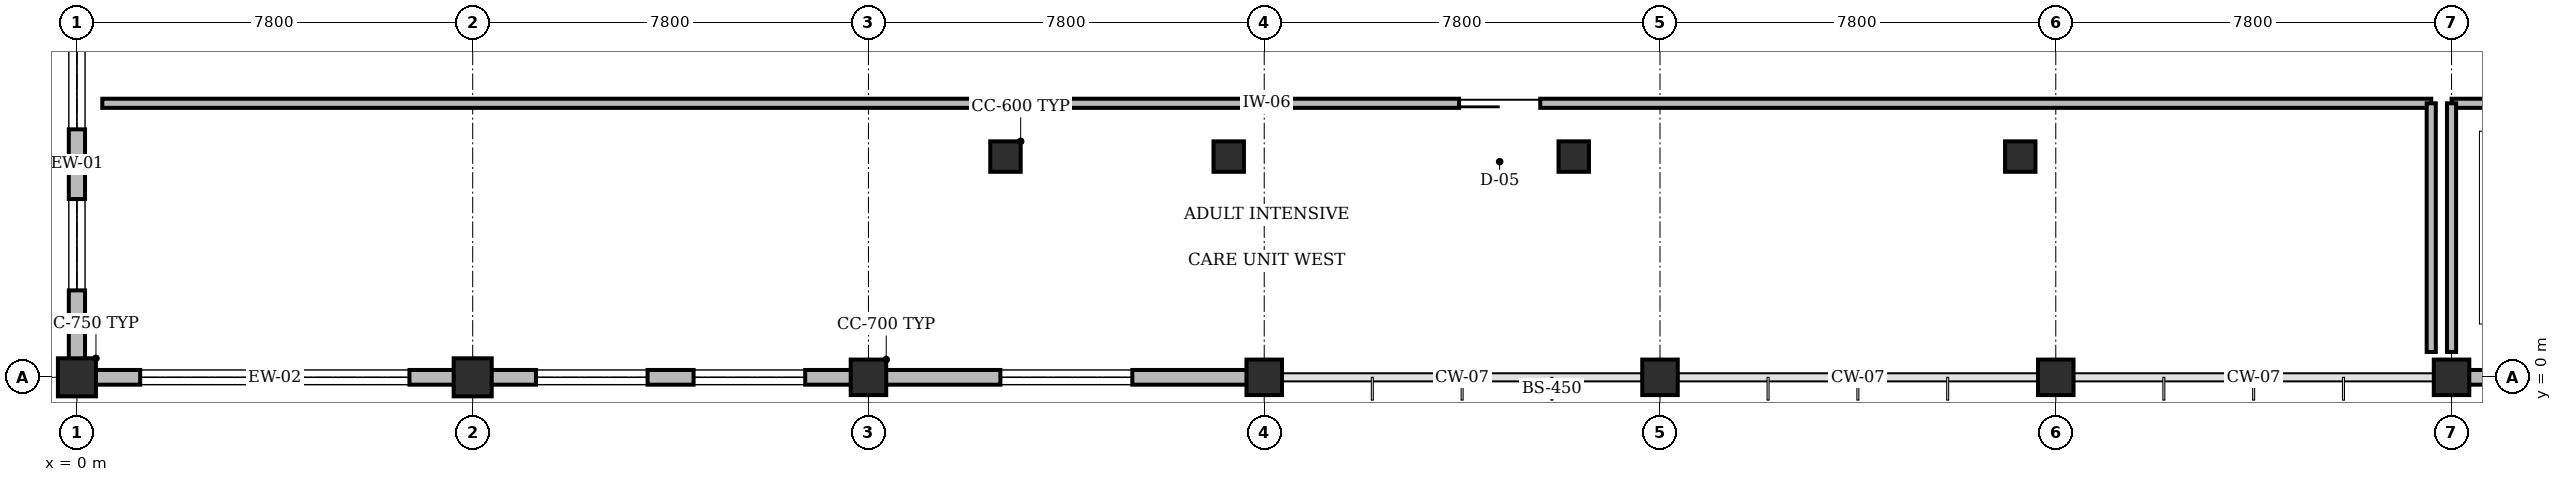
"""IFC4 building model, lengths in metres.
Left out: names, types, materials, properties, quantities, classifications, styles, units other than length and angle.
Written with IfcOpenShell. Run it as: python <this file> out.ifc"""

import sys

from ifc_helpers import new_model, si_unit, direction, frame, frame_2d, origin, origin_2d, place, context, subcontext, project, spatial, rectangle, circle, extrude, element, fill, save


model = new_model("IFC4")
c1 = context("Model", 3, precision=1e-05, world=origin(), true_north=direction((0.0, 1.0)))
c2 = subcontext(c1, "Body", "Model", "MODEL_VIEW")
j1 = project(units=[si_unit("LENGTHUNIT", "METRE"), si_unit("PLANEANGLEUNIT", "RADIAN")], contexts=[c1])
p1 = place(None, origin())
s1 = spatial("IfcSite", under=j1, at=p1, CompositionType="ELEMENT")
p2 = place(p1, origin())
s2 = spatial("IfcBuilding", under=s1, at=p2, CompositionType="ELEMENT")
p3 = place(p2, frame((0.0, 0.0, 9.6)))
s3 = spatial("IfcBuildingStorey", under=s2, at=p3, CompositionType="ELEMENT", Elevation=9.6)
for number, where, z_axis, x_axis in (
    (1, (0.0, 0.0, 0.0), (0.0, 0.0, 1.0), (1.0, 0.0, 0.0)),
    (2, (7.8, 0.0, 0.0), (0.0, 0.0, 1.0), (1.0, 0.0, 0.0)),
):
    element("IfcColumn", number, at=place(p3, frame(where, z_axis=z_axis, x_axis=x_axis)), inside=s3, PredefinedType="COLUMN", context=c2, shape_type="SweptSolid", body=[
        extrude(rectangle(XDim=0.75, YDim=0.75, at=origin_2d()), origin(), (0.0, 0.0, 1.0), 4.8),
    ])
for number, where, z_axis, x_axis in (
    (3, (15.6, 0.0, 0.0), (0.0, 0.0, 1.0), (1.0, 0.0, 0.0)),
    (4, (23.4, 0.0, 0.0), (0.0, 0.0, 1.0), (1.0, 0.0, 0.0)),
    (5, (31.2, 0.0, 0.0), (0.0, 0.0, 1.0), (1.0, 0.0, 0.0)),
    (6, (39.0, 0.0, 0.0), (0.0, 0.0, 1.0), (1.0, 0.0, 0.0)),
    (7, (46.8, 0.0, 0.0), (0.0, 0.0, 1.0), (1.0, 0.0, 0.0)),
):
    element("IfcColumn", number, at=place(p3, frame(where, z_axis=z_axis, x_axis=x_axis)), inside=s3, PredefinedType="PILASTER", context=c2, shape_type="SweptSolid", body=[
        extrude(circle(Radius=0.35, at=origin_2d()), origin(), (0.0, 0.0, 1.0), 4.8),
    ])
for number, where, z_axis, x_axis in (
    (8, (18.3, 4.35, 0.0), (0.0, 0.0, 1.0), (1.0, 0.0, 0.0)),
    (9, (22.7, 4.35, 0.0), (0.0, 0.0, 1.0), (1.0, 0.0, 0.0)),
    (10, (29.5, 4.35, 0.0), (0.0, 0.0, 1.0), (1.0, 0.0, 0.0)),
    (11, (38.3, 4.35, 0.0), (0.0, 0.0, 1.0), (1.0, 0.0, 0.0)),
):
    element("IfcColumn", number, at=place(p3, frame(where, z_axis=z_axis, x_axis=x_axis)), inside=s3, PredefinedType="PILASTER", context=c2, shape_type="SweptSolid", body=[
        extrude(circle(Radius=0.3, at=origin_2d()), origin(), (0.0, 0.0, 1.0), 4.8),
    ])
p4 = place(p3, frame((7.46, 0.0, 0.0), z_axis=(0.0, 0.0, 1.0), x_axis=(-1.0, 0.0, 0.0)))
e12 = element("IfcWall", 12, at=p4, inside=s3, PredefinedType="STANDARD", context=c2, shape_type="SweptSolid", body=[
    extrude(rectangle(XDim=7.12, YDim=0.29, at=frame_2d((3.56, 0.0))), origin(), (0.0, 0.0, 1.0), 3.73),
])
p5 = place(p4, frame((0.907, 0.0, 0.9)))
e13 = element("IfcOpeningElement", 13, at=p5, cuts=e12, PredefinedType="OPENING", context=c2, shape_type="SweptSolid", body=[
    extrude(rectangle(XDim=2.2, YDim=1.65, at=frame_2d((1.1, 0.825))), frame((0.0, 0.155, 0.0), z_axis=(0.0, -1.0, 0.0), x_axis=(1.0, 0.0, 0.0)), (0.0, 0.0, 1.0), 0.31),
])
p6 = place(p4, frame((4.013, 0.0, 0.9)))
e14 = element("IfcOpeningElement", 14, at=p6, cuts=e12, PredefinedType="OPENING", context=c2, shape_type="SweptSolid", body=[
    extrude(rectangle(XDim=2.2, YDim=1.65, at=frame_2d((1.1, 0.825))), frame((0.0, 0.155, 0.0), z_axis=(0.0, -1.0, 0.0), x_axis=(1.0, 0.0, 0.0)), (0.0, 0.0, 1.0), 0.31),
])
p7 = place(p3, frame((15.26, 0.0, 0.0), z_axis=(0.0, 0.0, 1.0), x_axis=(-1.0, 0.0, 0.0)))
e15 = element("IfcWall", 15, at=p7, inside=s3, PredefinedType="STANDARD", context=c2, shape_type="SweptSolid", body=[
    extrude(rectangle(XDim=7.12, YDim=0.29, at=frame_2d((3.56, 0.0))), origin(), (0.0, 0.0, 1.0), 3.73),
])
p8 = place(p7, frame((0.907, 0.0, 0.9)))
e16 = element("IfcOpeningElement", 16, at=p8, cuts=e15, PredefinedType="OPENING", context=c2, shape_type="SweptSolid", body=[
    extrude(rectangle(XDim=2.2, YDim=1.65, at=frame_2d((1.1, 0.825))), frame((0.0, 0.155, 0.0), z_axis=(0.0, -1.0, 0.0), x_axis=(1.0, 0.0, 0.0)), (0.0, 0.0, 1.0), 0.31),
])
p9 = place(p7, frame((4.013, 0.0, 0.9)))
e17 = element("IfcOpeningElement", 17, at=p9, cuts=e15, PredefinedType="OPENING", context=c2, shape_type="SweptSolid", body=[
    extrude(rectangle(XDim=2.2, YDim=1.65, at=frame_2d((1.1, 0.825))), frame((0.0, 0.155, 0.0), z_axis=(0.0, -1.0, 0.0), x_axis=(1.0, 0.0, 0.0)), (0.0, 0.0, 1.0), 0.31),
])
p10 = place(p3, frame((0.0, 0.34, 0.0), z_axis=(0.0, 0.0, 1.0), x_axis=(0.0, 1.0, 0.0)))
e18 = element("IfcWall", 18, at=p10, inside=s3, PredefinedType="STANDARD", context=c2, shape_type="SweptSolid", body=[
    extrude(rectangle(XDim=7.72, YDim=0.32, at=frame_2d((3.86, 0.0))), origin(), (0.0, 0.0, 1.0), 3.715),
])
p11 = place(p10, frame((1.373, 0.0, 0.9)))
e19 = element("IfcOpeningElement", 19, at=p11, cuts=e18, PredefinedType="OPENING", context=c2, shape_type="SweptSolid", body=[
    extrude(rectangle(XDim=1.8, YDim=1.65, at=frame_2d((0.9, 0.825))), frame((0.0, 0.17, 0.0), z_axis=(0.0, -1.0, 0.0), x_axis=(1.0, 0.0, 0.0)), (0.0, 0.0, 1.0), 0.34),
])
p12 = place(p10, frame((4.547, 0.0, 0.9)))
e20 = element("IfcOpeningElement", 20, at=p12, cuts=e18, PredefinedType="OPENING", context=c2, shape_type="SweptSolid", body=[
    extrude(rectangle(XDim=1.8, YDim=1.65, at=frame_2d((0.9, 0.825))), frame((0.0, 0.17, 0.0), z_axis=(0.0, -1.0, 0.0), x_axis=(1.0, 0.0, 0.0)), (0.0, 0.0, 1.0), 0.34),
])
p13 = place(p3, frame((23.06, 0.0, 0.0), z_axis=(0.0, 0.0, 1.0), x_axis=(-1.0, 0.0, 0.0)))
e21 = element("IfcWall", 21, at=p13, inside=s3, PredefinedType="STANDARD", context=c2, shape_type="SweptSolid", body=[
    extrude(rectangle(XDim=7.12, YDim=0.29, at=frame_2d((3.56, 0.0))), origin(), (0.0, 0.0, 1.0), 3.73),
])
p14 = place(p13, frame((2.26, 0.0, 0.9)))
e22 = element("IfcOpeningElement", 22, at=p14, cuts=e21, PredefinedType="OPENING", context=c2, shape_type="SweptSolid", body=[
    extrude(rectangle(XDim=2.6, YDim=1.65, at=frame_2d((1.3, 0.825))), frame((0.0, 0.155, 0.0), z_axis=(0.0, -1.0, 0.0), x_axis=(1.0, 0.0, 0.0)), (0.0, 0.0, 1.0), 0.31),
])
p15 = place(p3, frame((54.26, 0.0, 0.0), z_axis=(0.0, 0.0, 1.0), x_axis=(-1.0, 0.0, 0.0)))
e23 = element("IfcWall", 23, at=p15, inside=s3, PredefinedType="STANDARD", context=c2, shape_type="SweptSolid", body=[
    extrude(rectangle(XDim=7.12, YDim=0.29, at=frame_2d((3.56, 0.0))), origin(), (0.0, 0.0, 1.0), 3.73),
])
p16 = place(p15, frame((2.26, 0.0, 0.9)))
e24 = element("IfcOpeningElement", 24, at=p16, cuts=e23, PredefinedType="OPENING", context=c2, shape_type="SweptSolid", body=[
    extrude(rectangle(XDim=2.6, YDim=1.65, at=frame_2d((1.3, 0.825))), frame((0.0, 0.155, 0.0), z_axis=(0.0, -1.0, 0.0), x_axis=(1.0, 0.0, 0.0)), (0.0, 0.0, 1.0), 0.31),
])
p17 = place(p3, frame((0.5, 5.4, 0.0), z_axis=(0.0, 0.0, 1.0), x_axis=(1.0, 0.0, 0.0)))
e25 = element("IfcWall", 25, at=p17, inside=s3, PredefinedType="PARTITIONING", context=c2, shape_type="SweptSolid", body=[
    extrude(rectangle(XDim=45.9, YDim=0.18, at=frame_2d((22.95, 0.0))), origin(), (0.0, 0.0, 1.0), 4.46),
])
p18 = place(p17, frame((26.74, 0.0, 0.0)))
e26 = element("IfcOpeningElement", 26, at=p18, cuts=e25, PredefinedType="OPENING", context=c2, shape_type="SweptSolid", body=[
    extrude(rectangle(XDim=1.6, YDim=2.25, at=frame_2d((0.8, 1.125))), frame((0.0, 0.1, 0.0), z_axis=(0.0, -1.0, 0.0), x_axis=(1.0, 0.0, 0.0)), (0.0, 0.0, 1.0), 0.2),
])
p19 = place(p3, frame((46.4, 0.5, 0.0), z_axis=(0.0, 0.0, 1.0), x_axis=(0.0, 1.0, 0.0)))
e27 = element("IfcWall", 27, at=p19, inside=s3, PredefinedType="PARTITIONING", context=c2, shape_type="SweptSolid", body=[
    extrude(rectangle(XDim=4.9, YDim=0.18, at=frame_2d((2.45, 0.0))), origin(), (0.0, 0.0, 1.0), 3.73),
])
p20 = place(p3, frame((46.8, 5.4, 0.0), z_axis=(0.0, 0.0, 1.0), x_axis=(1.0, 0.0, 0.0)))
e28 = element("IfcWall", 28, at=p20, inside=s3, PredefinedType="PARTITIONING", context=c2, shape_type="SweptSolid", body=[
    extrude(rectangle(XDim=46.6, YDim=0.18, at=frame_2d((23.3, 0.0))), origin(), (0.0, 0.0, 1.0), 4.46),
])
p21 = place(p20, frame((22.5, 0.0, 0.0)))
e29 = element("IfcOpeningElement", 29, at=p21, cuts=e28, PredefinedType="OPENING", context=c2, shape_type="SweptSolid", body=[
    extrude(rectangle(XDim=1.6, YDim=2.25, at=frame_2d((0.8, 1.125))), frame((0.0, 0.1, 0.0), z_axis=(0.0, -1.0, 0.0), x_axis=(1.0, 0.0, 0.0)), (0.0, 0.0, 1.0), 0.2),
])
p22 = place(p3, frame((46.8, 0.5, 0.0), z_axis=(0.0, 0.0, 1.0), x_axis=(0.0, 1.0, 0.0)))
e30 = element("IfcWall", 30, at=p22, inside=s3, PredefinedType="PARTITIONING", context=c2, shape_type="SweptSolid", body=[
    extrude(rectangle(XDim=4.9, YDim=0.18, at=frame_2d((2.45, 0.0))), origin(), (0.0, 0.0, 1.0), 3.715),
])
p23 = place(p5, origin())
e31 = element("IfcWindow", 31, at=p23, inside=s3, PartitioningType="SINGLE_PANEL", PredefinedType="WINDOW", context=c2, shape_type="SweptSolid", body=[
    extrude(rectangle(XDim=2.2, YDim=1.65, at=frame_2d((1.1, 0.825))), frame((0.0, 0.03, 0.0), z_axis=(0.0, -1.0, 0.0), x_axis=(1.0, 0.0, 0.0)), (0.0, 0.0, 1.0), 0.06),
])
fill(e13, e31)
p24 = place(p6, origin())
e32 = element("IfcWindow", 32, at=p24, inside=s3, PartitioningType="SINGLE_PANEL", PredefinedType="WINDOW", context=c2, shape_type="SweptSolid", body=[
    extrude(rectangle(XDim=2.2, YDim=1.65, at=frame_2d((1.1, 0.825))), frame((0.0, 0.03, 0.0), z_axis=(0.0, -1.0, 0.0), x_axis=(1.0, 0.0, 0.0)), (0.0, 0.0, 1.0), 0.06),
])
fill(e14, e32)
p25 = place(p8, origin())
e33 = element("IfcWindow", 33, at=p25, inside=s3, PartitioningType="SINGLE_PANEL", PredefinedType="WINDOW", context=c2, shape_type="SweptSolid", body=[
    extrude(rectangle(XDim=2.2, YDim=1.65, at=frame_2d((1.1, 0.825))), frame((0.0, 0.03, 0.0), z_axis=(0.0, -1.0, 0.0), x_axis=(1.0, 0.0, 0.0)), (0.0, 0.0, 1.0), 0.06),
])
fill(e16, e33)
p26 = place(p9, origin())
e34 = element("IfcWindow", 34, at=p26, inside=s3, PartitioningType="SINGLE_PANEL", PredefinedType="WINDOW", context=c2, shape_type="SweptSolid", body=[
    extrude(rectangle(XDim=2.2, YDim=1.65, at=frame_2d((1.1, 0.825))), frame((0.0, 0.03, 0.0), z_axis=(0.0, -1.0, 0.0), x_axis=(1.0, 0.0, 0.0)), (0.0, 0.0, 1.0), 0.06),
])
fill(e17, e34)
p27 = place(p11, origin())
e35 = element("IfcWindow", 35, at=p27, inside=s3, PartitioningType="SINGLE_PANEL", PredefinedType="WINDOW", context=c2, shape_type="SweptSolid", body=[
    extrude(rectangle(XDim=1.8, YDim=1.65, at=frame_2d((0.9, 0.825))), frame((0.0, 0.03, 0.0), z_axis=(0.0, -1.0, 0.0), x_axis=(1.0, 0.0, 0.0)), (0.0, 0.0, 1.0), 0.06),
])
fill(e19, e35)
p28 = place(p12, origin())
e36 = element("IfcWindow", 36, at=p28, inside=s3, PartitioningType="SINGLE_PANEL", PredefinedType="WINDOW", context=c2, shape_type="SweptSolid", body=[
    extrude(rectangle(XDim=1.8, YDim=1.65, at=frame_2d((0.9, 0.825))), frame((0.0, 0.03, 0.0), z_axis=(0.0, -1.0, 0.0), x_axis=(1.0, 0.0, 0.0)), (0.0, 0.0, 1.0), 0.06),
])
fill(e20, e36)
p29 = place(p14, origin())
e37 = element("IfcWindow", 37, at=p29, inside=s3, PartitioningType="SINGLE_PANEL", PredefinedType="WINDOW", context=c2, shape_type="SweptSolid", body=[
    extrude(rectangle(XDim=2.6, YDim=1.65, at=frame_2d((1.3, 0.825))), frame((0.0, 0.03, 0.0), z_axis=(0.0, -1.0, 0.0), x_axis=(1.0, 0.0, 0.0)), (0.0, 0.0, 1.0), 0.06),
])
fill(e22, e37)
p30 = place(p18, origin())
e38 = element("IfcDoor", 38, at=p30, inside=s3, OperationType="SLIDING_TO_RIGHT", PredefinedType="DOOR", context=c2, shape_type="SweptSolid", body=[
    extrude(rectangle(XDim=1.6, YDim=2.25, at=frame_2d((0.8, 1.125))), frame((0.0, 0.025, 0.0), z_axis=(0.0, -1.0, 0.0), x_axis=(1.0, 0.0, 0.0)), (0.0, 0.0, 1.0), 0.05),
])
fill(e26, e38)
save(model, sys.argv[1])
